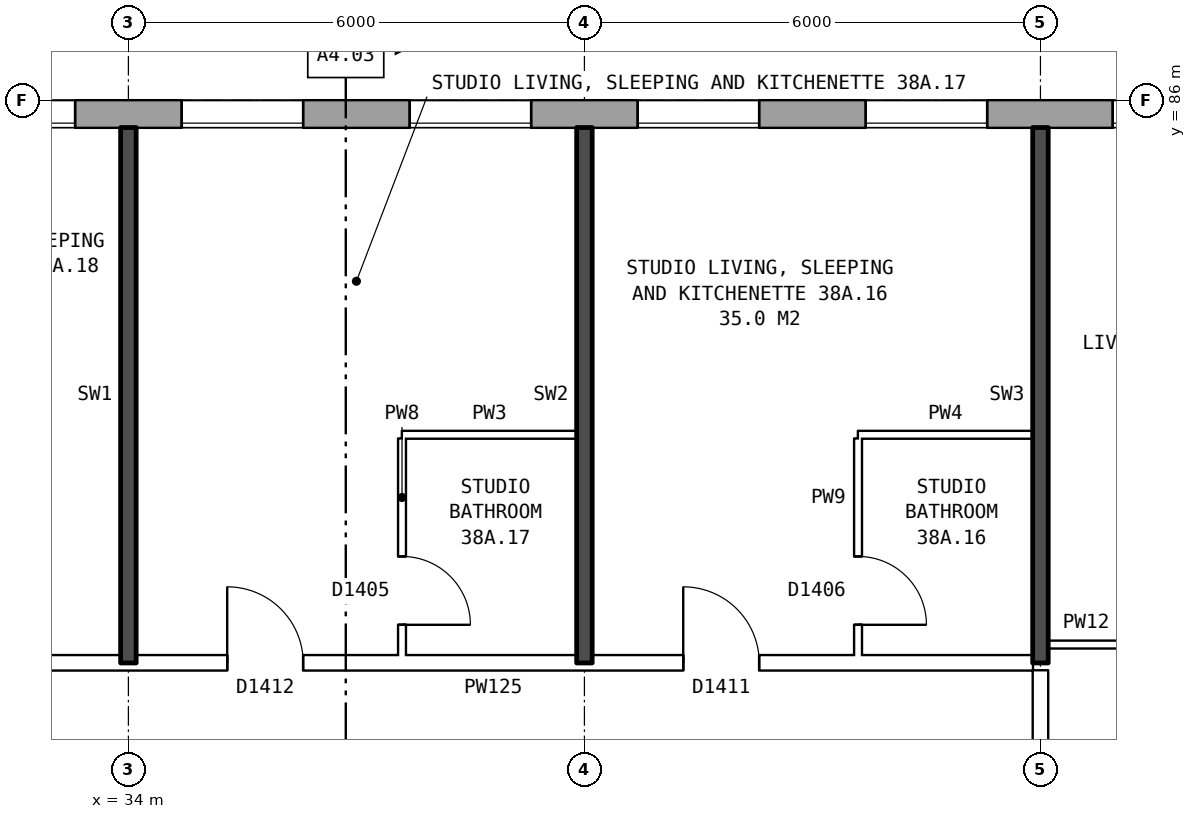
"""IFC4 building model, lengths in metres.
Left out: names, types, materials, properties, quantities, classifications, styles, units other than length and angle.
Written with IfcOpenShell. Run it as: python <this file> out.ifc"""

import sys

from ifc_helpers import new_model, si_unit, direction, frame, frame_2d, origin, place, context, subcontext, project, spatial, rectangle, extrude, element, fill, save


model = new_model("IFC4")
c1 = context("Model", 3, precision=1e-05, world=origin(), true_north=direction((0.0, 1.0)))
c2 = subcontext(c1, "Body", "Model", "MODEL_VIEW")
j1 = project(units=[si_unit("LENGTHUNIT", "METRE"), si_unit("PLANEANGLEUNIT", "RADIAN")], contexts=[c1])
p1 = place(None, origin())
s1 = spatial("IfcSite", under=j1, at=p1, CompositionType="ELEMENT")
p2 = place(p1, origin())
s2 = spatial("IfcBuilding", under=s1, at=p2, CompositionType="ELEMENT")
p3 = place(p2, frame((0.0, 0.0, 136.1)))
s3 = spatial("IfcBuildingStorey", under=s2, at=p3, CompositionType="ELEMENT", Elevation=136.1)
p4 = place(p3, frame((72.925, 85.82, 0.0), z_axis=(0.0, 0.0, 1.0), x_axis=(-1.0, 0.0, 0.0)))
e1 = element("IfcWall", 1, at=p4, inside=s3, PredefinedType="STANDARD", context=c2, shape_type="SweptSolid", body=[
    extrude(rectangle(XDim=43.101, YDim=0.36, at=frame_2d((21.55, 0.0))), origin(), (0.0, 0.0, 1.0), 2.85),
])
p5 = place(p4, frame((0.625, 0.0, 0.8)))
e2 = element("IfcOpeningElement", 2, at=p5, cuts=e1, PredefinedType="OPENING", context=c2, shape_type="SweptSolid", body=[
    extrude(rectangle(XDim=1.6, YDim=1.8, at=frame_2d((0.8, 0.9))), frame((0.0, 0.19, 0.0), z_axis=(0.0, -1.0, 0.0), x_axis=(1.0, 0.0, 0.0)), (0.0, 0.0, 1.0), 0.38),
])
p6 = place(p4, frame((3.625, 0.0, 0.8)))
e3 = element("IfcOpeningElement", 3, at=p6, cuts=e1, PredefinedType="OPENING", context=c2, shape_type="SweptSolid", body=[
    extrude(rectangle(XDim=1.6, YDim=1.8, at=frame_2d((0.8, 0.9))), frame((0.0, 0.19, 0.0), z_axis=(0.0, -1.0, 0.0), x_axis=(1.0, 0.0, 0.0)), (0.0, 0.0, 1.0), 0.38),
])
p7 = place(p4, frame((6.625, 0.0, 0.8)))
e4 = element("IfcOpeningElement", 4, at=p7, cuts=e1, PredefinedType="OPENING", context=c2, shape_type="SweptSolid", body=[
    extrude(rectangle(XDim=1.6, YDim=1.8, at=frame_2d((0.8, 0.9))), frame((0.0, 0.19, 0.0), z_axis=(0.0, -1.0, 0.0), x_axis=(1.0, 0.0, 0.0)), (0.0, 0.0, 1.0), 0.38),
])
p8 = place(p4, frame((9.625, 0.0, 0.8)))
e5 = element("IfcOpeningElement", 5, at=p8, cuts=e1, PredefinedType="OPENING", context=c2, shape_type="SweptSolid", body=[
    extrude(rectangle(XDim=1.6, YDim=1.8, at=frame_2d((0.8, 0.9))), frame((0.0, 0.19, 0.0), z_axis=(0.0, -1.0, 0.0), x_axis=(1.0, 0.0, 0.0)), (0.0, 0.0, 1.0), 0.38),
])
p9 = place(p4, frame((12.625, 0.0, 0.8)))
e6 = element("IfcOpeningElement", 6, at=p9, cuts=e1, PredefinedType="OPENING", context=c2, shape_type="SweptSolid", body=[
    extrude(rectangle(XDim=1.6, YDim=1.8, at=frame_2d((0.8, 0.9))), frame((0.0, 0.19, 0.0), z_axis=(0.0, -1.0, 0.0), x_axis=(1.0, 0.0, 0.0)), (0.0, 0.0, 1.0), 0.38),
])
p10 = place(p4, frame((15.125, 0.0, 1.35)))
e7 = element("IfcOpeningElement", 7, at=p10, cuts=e1, PredefinedType="OPENING", context=c2, shape_type="SweptSolid", body=[
    extrude(rectangle(XDim=1.0, YDim=1.2, at=frame_2d((0.5, 0.6))), frame((0.0, 0.19, 0.0), z_axis=(0.0, -1.0, 0.0), x_axis=(1.0, 0.0, 0.0)), (0.0, 0.0, 1.0), 0.38),
])
p11 = place(p4, frame((18.625, 0.0, 0.8)))
e8 = element("IfcOpeningElement", 8, at=p11, cuts=e1, PredefinedType="OPENING", context=c2, shape_type="SweptSolid", body=[
    extrude(rectangle(XDim=1.6, YDim=1.8, at=frame_2d((0.8, 0.9))), frame((0.0, 0.19, 0.0), z_axis=(0.0, -1.0, 0.0), x_axis=(1.0, 0.0, 0.0)), (0.0, 0.0, 1.0), 0.38),
])
p12 = place(p4, frame((21.625, 0.0, 0.8)))
e9 = element("IfcOpeningElement", 9, at=p12, cuts=e1, PredefinedType="OPENING", context=c2, shape_type="SweptSolid", body=[
    extrude(rectangle(XDim=1.6, YDim=1.8, at=frame_2d((0.8, 0.9))), frame((0.0, 0.19, 0.0), z_axis=(0.0, -1.0, 0.0), x_axis=(1.0, 0.0, 0.0)), (0.0, 0.0, 1.0), 0.38),
])
p13 = place(p4, frame((24.075, 0.0, 0.35)))
e10 = element("IfcOpeningElement", 10, at=p13, cuts=e1, PredefinedType="OPENING", context=c2, shape_type="SweptSolid", body=[
    extrude(rectangle(XDim=0.8, YDim=1.8, at=frame_2d((0.4, 0.9))), frame((0.0, 0.19, 0.0), z_axis=(0.0, -1.0, 0.0), x_axis=(1.0, 0.0, 0.0)), (0.0, 0.0, 1.0), 0.38),
])
p14 = place(p4, frame((27.625, 0.0, 0.8)))
e11 = element("IfcOpeningElement", 11, at=p14, cuts=e1, PredefinedType="OPENING", context=c2, shape_type="SweptSolid", body=[
    extrude(rectangle(XDim=1.6, YDim=1.8, at=frame_2d((0.8, 0.9))), frame((0.0, 0.19, 0.0), z_axis=(0.0, -1.0, 0.0), x_axis=(1.0, 0.0, 0.0)), (0.0, 0.0, 1.0), 0.38),
])
p15 = place(p4, frame((30.625, 0.0, 0.8)))
e12 = element("IfcOpeningElement", 12, at=p15, cuts=e1, PredefinedType="OPENING", context=c2, shape_type="SweptSolid", body=[
    extrude(rectangle(XDim=1.6, YDim=1.8, at=frame_2d((0.8, 0.9))), frame((0.0, 0.19, 0.0), z_axis=(0.0, -1.0, 0.0), x_axis=(1.0, 0.0, 0.0)), (0.0, 0.0, 1.0), 0.38),
])
p16 = place(p4, frame((33.625, 0.0, 0.8)))
e13 = element("IfcOpeningElement", 13, at=p16, cuts=e1, PredefinedType="OPENING", context=c2, shape_type="SweptSolid", body=[
    extrude(rectangle(XDim=1.6, YDim=1.8, at=frame_2d((0.8, 0.9))), frame((0.0, 0.19, 0.0), z_axis=(0.0, -1.0, 0.0), x_axis=(1.0, 0.0, 0.0)), (0.0, 0.0, 1.0), 0.38),
])
p17 = place(p4, frame((36.625, 0.0, 0.8)))
e14 = element("IfcOpeningElement", 14, at=p17, cuts=e1, PredefinedType="OPENING", context=c2, shape_type="SweptSolid", body=[
    extrude(rectangle(XDim=1.6, YDim=1.8, at=frame_2d((0.8, 0.9))), frame((0.0, 0.19, 0.0), z_axis=(0.0, -1.0, 0.0), x_axis=(1.0, 0.0, 0.0)), (0.0, 0.0, 1.0), 0.38),
])
p18 = place(p4, frame((39.625, 0.0, 0.8)))
e15 = element("IfcOpeningElement", 15, at=p18, cuts=e1, PredefinedType="OPENING", context=c2, shape_type="SweptSolid", body=[
    extrude(rectangle(XDim=1.6, YDim=1.8, at=frame_2d((0.8, 0.9))), frame((0.0, 0.19, 0.0), z_axis=(0.0, -1.0, 0.0), x_axis=(1.0, 0.0, 0.0)), (0.0, 0.0, 1.0), 0.38),
])
p19 = place(p4, frame((16.975, 0.0, 0.15)))
e16 = element("IfcOpeningElement", 16, at=p19, cuts=e1, PredefinedType="OPENING", context=c2, shape_type="SweptSolid", body=[
    extrude(rectangle(XDim=0.8, YDim=0.9, at=frame_2d((0.4, 0.45))), frame((0.0, 0.19, 0.0), z_axis=(0.0, -1.0, 0.0), x_axis=(1.0, 0.0, 0.0)), (0.0, 0.0, 1.0), 0.38),
])
p20 = place(p4, frame((25.175, 0.0, 0.25)))
e17 = element("IfcOpeningElement", 17, at=p20, cuts=e1, PredefinedType="OPENING", context=c2, shape_type="SweptSolid", body=[
    extrude(rectangle(XDim=0.8, YDim=0.9, at=frame_2d((0.4, 0.45))), frame((0.0, 0.19, 0.0), z_axis=(0.0, -1.0, 0.0), x_axis=(1.0, 0.0, 0.0)), (0.0, 0.0, 1.0), 0.38),
])
p21 = place(p3, frame((27.11, 78.6, 0.0), z_axis=(0.0, 0.0, 1.0), x_axis=(1.0, 0.0, 0.0)))
e18 = element("IfcWall", 18, at=p21, inside=s3, PredefinedType="PARTITIONING", context=c2, shape_type="SweptSolid", body=[
    extrude(rectangle(XDim=18.79, YDim=0.2, at=frame_2d((9.395, 0.0))), origin(), (0.0, 0.0, 1.0), 2.85),
])
p22 = place(p21, frame((14.19, 0.0, 0.0)))
e19 = element("IfcOpeningElement", 19, at=p22, cuts=e18, PredefinedType="OPENING", context=c2, shape_type="SweptSolid", body=[
    extrude(rectangle(XDim=1.0, YDim=2.1, at=frame_2d((0.5, 1.05))), frame((0.0, 0.11, 0.0), z_axis=(0.0, -1.0, 0.0), x_axis=(1.0, 0.0, 0.0)), (0.0, 0.0, 1.0), 0.22),
])
p23 = place(p21, frame((8.19, 0.0, 0.0)))
e20 = element("IfcOpeningElement", 20, at=p23, cuts=e18, PredefinedType="OPENING", context=c2, shape_type="SweptSolid", body=[
    extrude(rectangle(XDim=1.0, YDim=2.1, at=frame_2d((0.5, 1.05))), frame((0.0, 0.11, 0.0), z_axis=(0.0, -1.0, 0.0), x_axis=(1.0, 0.0, 0.0)), (0.0, 0.0, 1.0), 0.22),
])
p24 = place(p21, frame((4.59, 0.0, 0.0)))
e21 = element("IfcOpeningElement", 21, at=p24, cuts=e18, PredefinedType="OPENING", context=c2, shape_type="SweptSolid", body=[
    extrude(rectangle(XDim=1.0, YDim=2.1, at=frame_2d((0.5, 1.05))), frame((0.0, 0.11, 0.0), z_axis=(0.0, -1.0, 0.0), x_axis=(1.0, 0.0, 0.0)), (0.0, 0.0, 1.0), 0.22),
])
p25 = place(p3, frame((46.1, 78.84, 0.0), z_axis=(0.0, 0.0, 1.0), x_axis=(1.0, 0.0, 0.0)))
e22 = element("IfcWall", 22, at=p25, inside=s3, PredefinedType="PARTITIONING", context=c2, shape_type="SweptSolid", body=[
    extrude(rectangle(XDim=2.9, YDim=0.1, at=frame_2d((1.45, 0.0))), origin(), (0.0, 0.0, 1.0), 2.85),
])
p26 = place(p25, frame((1.0, 0.0, 0.0)))
e23 = element("IfcOpeningElement", 23, at=p26, cuts=e22, PredefinedType="OPENING", context=c2, shape_type="SweptSolid", body=[
    extrude(rectangle(XDim=0.9, YDim=2.1, at=frame_2d((0.45, 1.05))), frame((0.0, 0.06, 0.0), z_axis=(0.0, -1.0, 0.0), x_axis=(1.0, 0.0, 0.0)), (0.0, 0.0, 1.0), 0.12),
])
for number, where, z_axis, x_axis in (
    (24, (37.6, 81.6, 0.0), (0.0, 0.0, 1.0), (1.0, 0.0, 0.0)),
    (25, (43.6, 81.6, 0.0), (0.0, 0.0, 1.0), (1.0, 0.0, 0.0)),
):
    element("IfcWall", number, at=place(p3, frame(where, z_axis=z_axis, x_axis=x_axis)), inside=s3, PredefinedType="PARTITIONING", context=c2, shape_type="SweptSolid", body=[
        extrude(rectangle(XDim=2.3, YDim=0.1, at=frame_2d((1.15, 0.0))), origin(), (0.0, 0.0, 1.0), 2.85),
    ])
p27 = place(p3, frame((34.0, 78.6, 0.0), z_axis=(0.0, 0.0, 1.0), x_axis=(0.0, 1.0, 0.0)))
e26 = element("IfcWall", 26, at=p27, inside=s3, PredefinedType="SOLIDWALL", context=c2, shape_type="SweptSolid", body=[
    extrude(rectangle(XDim=7.04, YDim=0.2, at=frame_2d((3.52, 0.0))), origin(), (0.0, 0.0, 1.0), 2.85),
])
p28 = place(p3, frame((37.6, 78.7, 0.0), z_axis=(0.0, 0.0, 1.0), x_axis=(0.0, 1.0, 0.0)))
e27 = element("IfcWall", 27, at=p28, inside=s3, PredefinedType="PARTITIONING", context=c2, shape_type="SweptSolid", body=[
    extrude(rectangle(XDim=2.85, YDim=0.1, at=frame_2d((1.425, 0.0))), origin(), (0.0, 0.0, 1.0), 2.85),
])
p29 = place(p28, frame((0.4, 0.0, 0.0)))
e28 = element("IfcOpeningElement", 28, at=p29, cuts=e27, PredefinedType="OPENING", context=c2, shape_type="SweptSolid", body=[
    extrude(rectangle(XDim=0.9, YDim=2.1, at=frame_2d((0.45, 1.05))), frame((0.0, 0.06, 0.0), z_axis=(0.0, -1.0, 0.0), x_axis=(1.0, 0.0, 0.0)), (0.0, 0.0, 1.0), 0.12),
])
p30 = place(p3, frame((40.0, 78.6, 0.0), z_axis=(0.0, 0.0, 1.0), x_axis=(0.0, 1.0, 0.0)))
e29 = element("IfcWall", 29, at=p30, inside=s3, PredefinedType="SOLIDWALL", context=c2, shape_type="SweptSolid", body=[
    extrude(rectangle(XDim=7.04, YDim=0.2, at=frame_2d((3.52, 0.0))), origin(), (0.0, 0.0, 1.0), 2.85),
])
p31 = place(p3, frame((43.6, 78.7, 0.0), z_axis=(0.0, 0.0, 1.0), x_axis=(0.0, 1.0, 0.0)))
e30 = element("IfcWall", 30, at=p31, inside=s3, PredefinedType="PARTITIONING", context=c2, shape_type="SweptSolid", body=[
    extrude(rectangle(XDim=2.85, YDim=0.1, at=frame_2d((1.425, 0.0))), origin(), (0.0, 0.0, 1.0), 2.85),
])
p32 = place(p31, frame((0.4, 0.0, 0.0)))
e31 = element("IfcOpeningElement", 31, at=p32, cuts=e30, PredefinedType="OPENING", context=c2, shape_type="SweptSolid", body=[
    extrude(rectangle(XDim=0.9, YDim=2.1, at=frame_2d((0.45, 1.05))), frame((0.0, 0.06, 0.0), z_axis=(0.0, -1.0, 0.0), x_axis=(1.0, 0.0, 0.0)), (0.0, 0.0, 1.0), 0.12),
])
p33 = place(p3, frame((46.0, 76.3, 0.0), z_axis=(0.0, 0.0, 1.0), x_axis=(0.0, 1.0, 0.0)))
e32 = element("IfcWall", 32, at=p33, inside=s3, PredefinedType="PARTITIONING", context=c2, shape_type="SweptSolid", body=[
    extrude(rectangle(XDim=2.2, YDim=0.2, at=frame_2d((1.1, 0.0))), origin(), (0.0, 0.0, 1.0), 2.85),
])
p34 = place(p3, frame((46.0, 78.6, 0.0), z_axis=(0.0, 0.0, 1.0), x_axis=(0.0, 1.0, 0.0)))
e33 = element("IfcWall", 33, at=p34, inside=s3, PredefinedType="SOLIDWALL", context=c2, shape_type="SweptSolid", body=[
    extrude(rectangle(XDim=7.04, YDim=0.2, at=frame_2d((3.52, 0.0))), origin(), (0.0, 0.0, 1.0), 2.85),
])
p35 = place(p14, origin())
e34 = element("IfcWindow", 34, at=p35, inside=s3, PartitioningType="SINGLE_PANEL", PredefinedType="WINDOW", context=c2, shape_type="SweptSolid", body=[
    extrude(rectangle(XDim=1.6, YDim=1.8, at=frame_2d((0.8, 0.9))), frame((0.0, 0.15, 0.0), z_axis=(0.0, -1.0, 0.0), x_axis=(1.0, 0.0, 0.0)), (0.0, 0.0, 1.0), 0.06),
])
fill(e11, e34)
p36 = place(p15, origin())
e35 = element("IfcWindow", 35, at=p36, inside=s3, PartitioningType="SINGLE_PANEL", PredefinedType="WINDOW", context=c2, shape_type="SweptSolid", body=[
    extrude(rectangle(XDim=1.6, YDim=1.8, at=frame_2d((0.8, 0.9))), frame((0.0, 0.15, 0.0), z_axis=(0.0, -1.0, 0.0), x_axis=(1.0, 0.0, 0.0)), (0.0, 0.0, 1.0), 0.06),
])
fill(e12, e35)
p37 = place(p16, origin())
e36 = element("IfcWindow", 36, at=p37, inside=s3, PartitioningType="SINGLE_PANEL", PredefinedType="WINDOW", context=c2, shape_type="SweptSolid", body=[
    extrude(rectangle(XDim=1.6, YDim=1.8, at=frame_2d((0.8, 0.9))), frame((0.0, 0.15, 0.0), z_axis=(0.0, -1.0, 0.0), x_axis=(1.0, 0.0, 0.0)), (0.0, 0.0, 1.0), 0.06),
])
fill(e13, e36)
p38 = place(p17, origin())
e37 = element("IfcWindow", 37, at=p38, inside=s3, PartitioningType="SINGLE_PANEL", PredefinedType="WINDOW", context=c2, shape_type="SweptSolid", body=[
    extrude(rectangle(XDim=1.6, YDim=1.8, at=frame_2d((0.8, 0.9))), frame((0.0, 0.15, 0.0), z_axis=(0.0, -1.0, 0.0), x_axis=(1.0, 0.0, 0.0)), (0.0, 0.0, 1.0), 0.06),
])
fill(e14, e37)
p39 = place(p18, origin())
e38 = element("IfcWindow", 38, at=p39, inside=s3, PartitioningType="SINGLE_PANEL", PredefinedType="WINDOW", context=c2, shape_type="SweptSolid", body=[
    extrude(rectangle(XDim=1.6, YDim=1.8, at=frame_2d((0.8, 0.9))), frame((0.0, 0.15, 0.0), z_axis=(0.0, -1.0, 0.0), x_axis=(1.0, 0.0, 0.0)), (0.0, 0.0, 1.0), 0.06),
])
fill(e15, e38)
p40 = place(p22, origin())
e39 = element("IfcDoor", 39, at=p40, inside=s3, OperationType="SINGLE_SWING_LEFT", PredefinedType="DOOR", context=c2, shape_type="SweptSolid", body=[
    extrude(rectangle(XDim=1.0, YDim=2.1, at=frame_2d((0.5, 1.05))), frame((0.0, 0.025, 0.0), z_axis=(0.0, -1.0, 0.0), x_axis=(1.0, 0.0, 0.0)), (0.0, 0.0, 1.0), 0.05),
])
fill(e19, e39)
p41 = place(p32, frame((0.9, 0.0, 0.0), z_axis=(0.0, 0.0, 1.0), x_axis=(-1.0, 0.0, 0.0)))
e40 = element("IfcDoor", 40, at=p41, inside=s3, OperationType="SINGLE_SWING_RIGHT", PredefinedType="DOOR", context=c2, shape_type="SweptSolid", body=[
    extrude(rectangle(XDim=0.9, YDim=2.1, at=frame_2d((0.45, 1.05))), frame((0.0, 0.025, 0.0), z_axis=(0.0, -1.0, 0.0), x_axis=(1.0, 0.0, 0.0)), (0.0, 0.0, 1.0), 0.05),
])
fill(e31, e40)
p42 = place(p23, origin())
e41 = element("IfcDoor", 41, at=p42, inside=s3, OperationType="SINGLE_SWING_LEFT", PredefinedType="DOOR", context=c2, shape_type="SweptSolid", body=[
    extrude(rectangle(XDim=1.0, YDim=2.1, at=frame_2d((0.5, 1.05))), frame((0.0, 0.025, 0.0), z_axis=(0.0, -1.0, 0.0), x_axis=(1.0, 0.0, 0.0)), (0.0, 0.0, 1.0), 0.05),
])
fill(e20, e41)
p43 = place(p29, frame((0.9, 0.0, 0.0), z_axis=(0.0, 0.0, 1.0), x_axis=(-1.0, 0.0, 0.0)))
e42 = element("IfcDoor", 42, at=p43, inside=s3, OperationType="SINGLE_SWING_RIGHT", PredefinedType="DOOR", context=c2, shape_type="SweptSolid", body=[
    extrude(rectangle(XDim=0.9, YDim=2.1, at=frame_2d((0.45, 1.05))), frame((0.0, 0.025, 0.0), z_axis=(0.0, -1.0, 0.0), x_axis=(1.0, 0.0, 0.0)), (0.0, 0.0, 1.0), 0.05),
])
fill(e28, e42)
p44 = place(p20, origin())
e43 = element("IfcWindow", 43, at=p44, inside=s3, PartitioningType="SINGLE_PANEL", PredefinedType="WINDOW", context=c2, shape_type="SweptSolid", body=[
    extrude(rectangle(XDim=0.8, YDim=0.9, at=frame_2d((0.4, 0.45))), frame((0.0, 0.15, 0.0), z_axis=(0.0, -1.0, 0.0), x_axis=(1.0, 0.0, 0.0)), (0.0, 0.0, 1.0), 0.06),
])
fill(e17, e43)
save(model, sys.argv[1])
